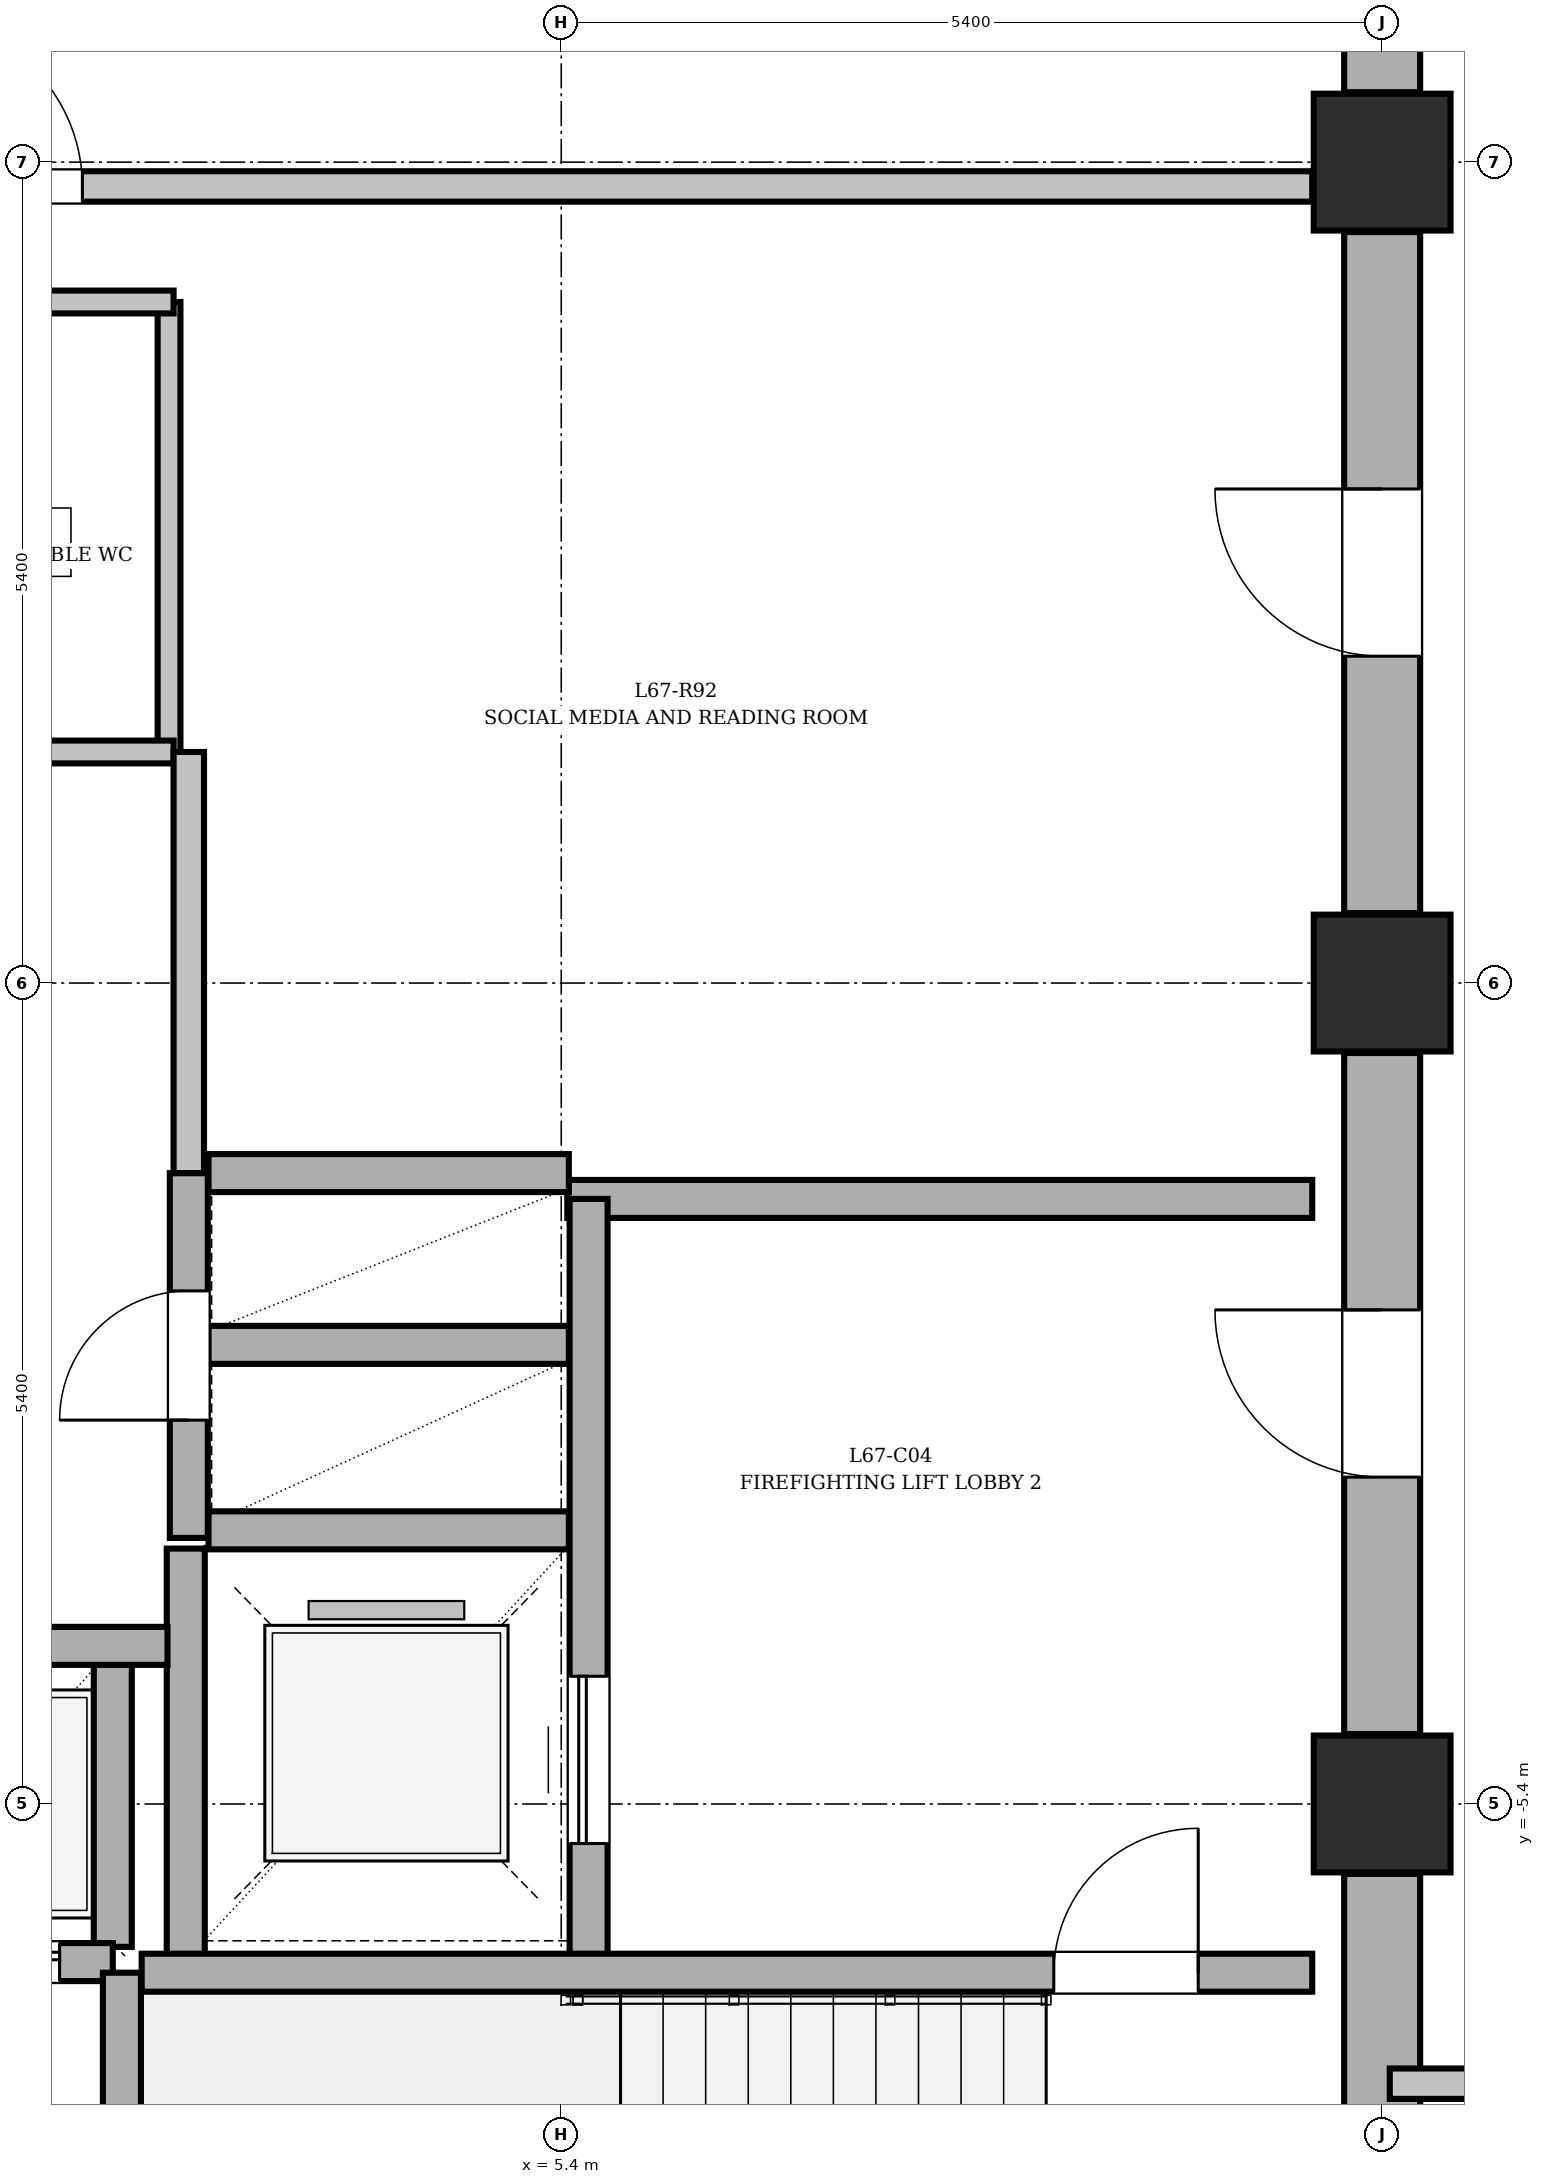
"""IFC4 building model, lengths in metres.
Left out: names, types, materials, properties, quantities, classifications, styles, units other than length and angle.
Written with IfcOpenShell. Run it as: python <this file> out.ifc"""

import sys

from ifc_helpers import new_model, si_unit, direction, frame, frame_2d, origin, origin_2d, place, context, subcontext, project, spatial, rectangle, extrude, element, fill, save


model = new_model("IFC4")
c1 = context("Model", 3, precision=1e-05, world=origin(), true_north=direction((0.0, 1.0)))
c2 = subcontext(c1, "Body", "Model", "MODEL_VIEW")
j1 = project(units=[si_unit("LENGTHUNIT", "METRE"), si_unit("PLANEANGLEUNIT", "RADIAN")], contexts=[c1])
p1 = place(None, origin())
s1 = spatial("IfcSite", under=j1, at=p1, CompositionType="ELEMENT")
p2 = place(p1, origin())
s2 = spatial("IfcBuilding", under=s1, at=p2, CompositionType="ELEMENT")
p3 = place(p2, frame((0.0, 0.0, 258.75)))
s3 = spatial("IfcBuildingStorey", under=s2, at=p3, CompositionType="ELEMENT", Elevation=258.75)
for number, where, z_axis, x_axis in (
    (1, (10.8, -5.4, 0.0), (0.0, 0.0, 1.0), (1.0, 0.0, 0.0)),
    (2, (10.8, 0.0, 0.0), (0.0, 0.0, 1.0), (1.0, 0.0, 0.0)),
    (3, (10.8, 5.4, 0.0), (0.0, 0.0, 1.0), (1.0, 0.0, 0.0)),
):
    element("IfcColumn", number, at=place(p3, frame(where, z_axis=z_axis, x_axis=x_axis)), inside=s3, PredefinedType="COLUMN", context=c2, shape_type="SweptSolid", body=[
        extrude(rectangle(XDim=0.9, YDim=0.9, at=origin_2d()), origin(), (0.0, 0.0, 1.0), 3.75),
    ])
p4 = place(p3, frame((10.8, -10.34, 0.0), z_axis=(0.0, 0.0, 1.0), x_axis=(0.0, 1.0, 0.0)))
e4 = element("IfcWall", 4, at=p4, inside=s3, PredefinedType="SHEAR", context=c2, shape_type="SweptSolid", body=[
    extrude(rectangle(XDim=4.48, YDim=0.5, at=frame_2d((2.24, 0.0))), origin(), (0.0, 0.0, 1.0), 3.75),
])
p5 = place(p3, frame((10.8, -4.94, 0.0), z_axis=(0.0, 0.0, 1.0), x_axis=(0.0, 1.0, 0.0)))
e5 = element("IfcWall", 5, at=p5, inside=s3, PredefinedType="SHEAR", context=c2, shape_type="SweptSolid", body=[
    extrude(rectangle(XDim=4.48, YDim=0.5, at=frame_2d((2.24, 0.0))), origin(), (0.0, 0.0, 1.0), 3.75),
])
p6 = place(p5, frame((1.69, 0.0, 0.0)))
e6 = element("IfcOpeningElement", 6, at=p6, cuts=e5, PredefinedType="OPENING", context=c2, shape_type="SweptSolid", body=[
    extrude(rectangle(XDim=1.1, YDim=2.1, at=frame_2d((0.55, 1.05))), frame((0.0, 0.26, 0.0), z_axis=(0.0, -1.0, 0.0), x_axis=(1.0, 0.0, 0.0)), (0.0, 0.0, 1.0), 0.52),
])
p7 = place(p3, frame((10.8, 0.46, 0.0), z_axis=(0.0, 0.0, 1.0), x_axis=(0.0, 1.0, 0.0)))
e7 = element("IfcWall", 7, at=p7, inside=s3, PredefinedType="SHEAR", context=c2, shape_type="SweptSolid", body=[
    extrude(rectangle(XDim=4.48, YDim=0.5, at=frame_2d((2.24, 0.0))), origin(), (0.0, 0.0, 1.0), 3.75),
])
p8 = place(p7, frame((1.69, 0.0, 0.0)))
e8 = element("IfcOpeningElement", 8, at=p8, cuts=e7, PredefinedType="OPENING", context=c2, shape_type="SweptSolid", body=[
    extrude(rectangle(XDim=1.1, YDim=2.1, at=frame_2d((0.55, 1.05))), frame((0.0, 0.26, 0.0), z_axis=(0.0, -1.0, 0.0), x_axis=(1.0, 0.0, 0.0)), (0.0, 0.0, 1.0), 0.52),
])
p9 = place(p3, frame((10.8, 5.86, 0.0), z_axis=(0.0, 0.0, 1.0), x_axis=(0.0, 1.0, 0.0)))
e9 = element("IfcWall", 9, at=p9, inside=s3, PredefinedType="SHEAR", context=c2, shape_type="SweptSolid", body=[
    extrude(rectangle(XDim=4.48, YDim=0.5, at=frame_2d((2.24, 0.0))), origin(), (0.0, 0.0, 1.0), 3.75),
])
p10 = place(p3, frame((2.93, -6.51, 0.0), z_axis=(0.0, 0.0, 1.0), x_axis=(0.0, 1.0, 0.0)))
e10 = element("IfcWall", 10, at=p10, inside=s3, PredefinedType="SHEAR", context=c2, shape_type="SweptSolid", body=[
    extrude(rectangle(XDim=2.79, YDim=0.25, at=frame_2d((1.395, 0.0))), origin(), (0.0, 0.0, 1.0), 3.75),
])
p11 = place(p3, frame((5.44, -1.42, 0.0), z_axis=(0.0, 0.0, 1.0), x_axis=(1.0, 0.0, 0.0)))
e11 = element("IfcWall", 11, at=p11, inside=s3, PredefinedType="SHEAR", context=c2, shape_type="SweptSolid", body=[
    extrude(rectangle(XDim=4.9, YDim=0.25, at=frame_2d((2.45, 0.0))), origin(), (0.0, 0.0, 1.0), 3.75),
])
p12 = place(p3, frame((3.08, -3.6, 0.0), z_axis=(0.0, 0.0, 1.0), x_axis=(1.0, 0.0, 0.0)))
e12 = element("IfcWall", 12, at=p12, inside=s3, PredefinedType="SHEAR", context=c2, shape_type="SweptSolid", body=[
    extrude(rectangle(XDim=2.37, YDim=0.25, at=frame_2d((1.185, 0.0))), origin(), (0.0, 0.0, 1.0), 3.75),
])
p13 = place(p3, frame((5.58, -6.51, 0.0), z_axis=(0.0, 0.0, 1.0), x_axis=(0.0, 1.0, 0.0)))
e13 = element("IfcWall", 13, at=p13, inside=s3, PredefinedType="SHEAR", context=c2, shape_type="SweptSolid", body=[
    extrude(rectangle(XDim=5.09, YDim=0.25, at=frame_2d((2.545, 0.0))), origin(), (0.0, 0.0, 1.0), 3.75),
])
p14 = place(p13, frame((0.85, 0.0, 0.0)))
e14 = element("IfcOpeningElement", 14, at=p14, cuts=e13, PredefinedType="OPENING", context=c2, shape_type="SweptSolid", body=[
    extrude(rectangle(XDim=1.1, YDim=2.1, at=frame_2d((0.55, 1.05))), frame((0.0, 0.135, 0.0), z_axis=(0.0, -1.0, 0.0), x_axis=(1.0, 0.0, 0.0)), (0.0, 0.0, 1.0), 0.27),
])
p15 = place(p3, frame((2.45, -6.34, 0.0), z_axis=(0.0, 0.0, 1.0), x_axis=(0.0, 1.0, 0.0)))
e15 = element("IfcWall", 15, at=p15, inside=s3, PredefinedType="SHEAR", context=c2, shape_type="SweptSolid", body=[
    extrude(rectangle(XDim=1.88, YDim=0.25, at=frame_2d((0.94, 0.0))), origin(), (0.0, 0.0, 1.0), 3.75),
])
p16 = place(p3, frame((-1.22, -6.44, 0.0), z_axis=(0.0, 0.0, 1.0), x_axis=(1.0, 0.0, 0.0)))
e16 = element("IfcWall", 16, at=p16, inside=s3, PredefinedType="SHEAR", context=c2, shape_type="SweptSolid", body=[
    extrude(rectangle(XDim=3.67, YDim=0.25, at=frame_2d((1.835, 0.0))), origin(), (0.0, 0.0, 1.0), 3.75),
])
p17 = place(p16, frame((0.35, 0.0, 0.0)))
e17 = element("IfcOpeningElement", 17, at=p17, cuts=e16, PredefinedType="OPENING", context=c2, shape_type="SweptSolid", body=[
    extrude(rectangle(XDim=1.1, YDim=2.1, at=frame_2d((0.55, 1.05))), frame((0.0, 0.135, 0.0), z_axis=(0.0, -1.0, 0.0), x_axis=(1.0, 0.0, 0.0)), (0.0, 0.0, 1.0), 0.27),
])
p18 = place(p16, frame((2.22, 0.0, 0.0)))
e18 = element("IfcOpeningElement", 18, at=p18, cuts=e16, PredefinedType="OPENING", context=c2, shape_type="SweptSolid", body=[
    extrude(rectangle(XDim=1.1, YDim=2.1, at=frame_2d((0.55, 1.05))), frame((0.0, 0.135, 0.0), z_axis=(0.0, -1.0, 0.0), x_axis=(1.0, 0.0, 0.0)), (0.0, 0.0, 1.0), 0.27),
])
p19 = place(p3, frame((-1.22, -4.36, 0.0), z_axis=(0.0, 0.0, 1.0), x_axis=(1.0, 0.0, 0.0)))
e19 = element("IfcWall", 19, at=p19, inside=s3, PredefinedType="SHEAR", context=c2, shape_type="SweptSolid", body=[
    extrude(rectangle(XDim=4.03, YDim=0.25, at=frame_2d((2.015, 0.0))), origin(), (0.0, 0.0, 1.0), 3.75),
])
for number, where, z_axis, x_axis in (
    (20, (3.08, -2.38, 0.0), (0.0, 0.0, 1.0), (1.0, 0.0, 0.0)),
    (21, (3.08, -1.25, 0.0), (0.0, 0.0, 1.0), (1.0, 0.0, 0.0)),
):
    element("IfcWall", number, at=place(p3, frame(where, z_axis=z_axis, x_axis=x_axis)), inside=s3, PredefinedType="SHEAR", context=c2, shape_type="SweptSolid", body=[
        extrude(rectangle(XDim=2.37, YDim=0.25, at=frame_2d((1.185, 0.0))), origin(), (0.0, 0.0, 1.0), 3.75),
    ])
p20 = place(p3, frame((2.95, -3.65, 0.0), z_axis=(0.0, 0.0, 1.0), x_axis=(0.0, 1.0, 0.0)))
e22 = element("IfcWall", 22, at=p20, inside=s3, PredefinedType="SHEAR", context=c2, shape_type="SweptSolid", body=[
    extrude(rectangle(XDim=2.4, YDim=0.25, at=frame_2d((1.2, 0.0))), origin(), (0.0, 0.0, 1.0), 3.75),
])
p21 = place(p20, frame((0.775, 0.0, 0.0)))
e23 = element("IfcOpeningElement", 23, at=p21, cuts=e22, PredefinedType="OPENING", context=c2, shape_type="SweptSolid", body=[
    extrude(rectangle(XDim=0.85, YDim=2.1, at=frame_2d((0.425, 1.05))), frame((0.0, 0.135, 0.0), z_axis=(0.0, -1.0, 0.0), x_axis=(1.0, 0.0, 0.0)), (0.0, 0.0, 1.0), 0.27),
])
p22 = place(p3, frame((2.64, -6.51, 0.0), z_axis=(0.0, 0.0, 1.0), x_axis=(1.0, 0.0, 0.0)))
e24 = element("IfcWall", 24, at=p22, inside=s3, PredefinedType="SHEAR", context=c2, shape_type="SweptSolid", body=[
    extrude(rectangle(XDim=7.7, YDim=0.25, at=frame_2d((3.85, 0.0))), origin(), (0.0, 0.0, 1.0), 3.75),
])
p23 = place(p22, frame((6.0, 0.0, 0.0)))
e25 = element("IfcOpeningElement", 25, at=p23, cuts=e24, PredefinedType="OPENING", context=c2, shape_type="SweptSolid", body=[
    extrude(rectangle(XDim=0.95, YDim=2.1, at=frame_2d((0.475, 1.05))), frame((0.0, 0.135, 0.0), z_axis=(0.0, -1.0, 0.0), x_axis=(1.0, 0.0, 0.0)), (0.0, 0.0, 1.0), 0.27),
])
p24 = place(p3, frame((2.51, -10.55, 0.0), z_axis=(0.0, 0.0, 1.0), x_axis=(0.0, 1.0, 0.0)))
e26 = element("IfcWall", 26, at=p24, inside=s3, PredefinedType="SHEAR", context=c2, shape_type="SweptSolid", body=[
    extrude(rectangle(XDim=4.04, YDim=0.25, at=frame_2d((2.02, 0.0))), origin(), (0.0, 0.0, 1.0), 3.75),
])
p25 = place(p3, frame((2.82, 1.52, 0.0), z_axis=(0.0, 0.0, 1.0), x_axis=(0.0, 1.0, 0.0)))
e27 = element("IfcWall", 27, at=p25, inside=s3, PredefinedType="PARTITIONING", context=c2, shape_type="SweptSolid", body=[
    extrude(rectangle(XDim=2.96, YDim=0.15, at=frame_2d((1.48, 0.0))), origin(), (0.0, 0.0, 1.0), 3.57),
])
for number, where, z_axis, x_axis in (
    (28, (0.18, 4.48, 0.0), (0.0, 0.0, 1.0), (1.0, 0.0, 0.0)),
    (29, (0.18, 1.52, 0.0), (0.0, 0.0, 1.0), (1.0, 0.0, 0.0)),
):
    element("IfcWall", number, at=place(p3, frame(where, z_axis=z_axis, x_axis=x_axis)), inside=s3, PredefinedType="PARTITIONING", context=c2, shape_type="SweptSolid", body=[
        extrude(rectangle(XDim=2.67, YDim=0.15, at=frame_2d((1.335, 0.0))), origin(), (0.0, 0.0, 1.0), 3.57),
    ])
p26 = place(p3, frame((0.35, 5.24, 0.0), z_axis=(0.0, 0.0, 1.0), x_axis=(1.0, 0.0, 0.0)))
e30 = element("IfcWall", 30, at=p26, inside=s3, PredefinedType="PARTITIONING", context=c2, shape_type="SweptSolid", body=[
    extrude(rectangle(XDim=9.99, YDim=0.2, at=frame_2d((4.995, 0.0))), origin(), (0.0, 0.0, 1.0), 3.57),
])
p27 = place(p26, frame((0.8, 0.0, 0.0)))
e31 = element("IfcOpeningElement", 31, at=p27, cuts=e30, PredefinedType="OPENING", context=c2, shape_type="SweptSolid", body=[
    extrude(rectangle(XDim=1.1, YDim=2.1, at=frame_2d((0.55, 1.05))), frame((0.0, 0.11, 0.0), z_axis=(0.0, -1.0, 0.0), x_axis=(1.0, 0.0, 0.0)), (0.0, 0.0, 1.0), 0.22),
])
p28 = place(p3, frame((10.85, -7.24, 0.0), z_axis=(0.0, 0.0, 1.0), x_axis=(1.0, 0.0, 0.0)))
e32 = element("IfcWall", 32, at=p28, inside=s3, PredefinedType="PARTITIONING", context=c2, shape_type="SweptSolid", body=[
    extrude(rectangle(XDim=2.31, YDim=0.2, at=frame_2d((1.155, 0.0))), origin(), (0.0, 0.0, 1.0), 3.57),
])
p29 = place(p3, frame((2.95, -1.25, 0.0), z_axis=(0.0, 0.0, 1.0), x_axis=(0.0, 1.0, 0.0)))
e33 = element("IfcWall", 33, at=p29, inside=s3, PredefinedType="PARTITIONING", context=c2, shape_type="SweptSolid", body=[
    extrude(rectangle(XDim=2.77, YDim=0.2, at=frame_2d((1.385, 0.0))), origin(), (0.0, 0.0, 1.0), 3.57),
])
p30 = place(p23, origin())
e34 = element("IfcDoor", 34, at=p30, inside=s3, OperationType="SINGLE_SWING_RIGHT", PredefinedType="DOOR", context=c2, shape_type="SweptSolid", body=[
    extrude(rectangle(XDim=0.95, YDim=2.1, at=frame_2d((0.475, 1.05))), frame((0.0, 0.025, 0.0), z_axis=(0.0, -1.0, 0.0), x_axis=(1.0, 0.0, 0.0)), (0.0, 0.0, 1.0), 0.05),
])
fill(e25, e34)
p31 = place(p21, origin())
e35 = element("IfcDoor", 35, at=p31, inside=s3, OperationType="SINGLE_SWING_LEFT", PredefinedType="DOOR", context=c2, shape_type="SweptSolid", body=[
    extrude(rectangle(XDim=0.85, YDim=2.1, at=frame_2d((0.425, 1.05))), frame((0.0, 0.025, 0.0), z_axis=(0.0, -1.0, 0.0), x_axis=(1.0, 0.0, 0.0)), (0.0, 0.0, 1.0), 0.05),
])
fill(e23, e35)
p32 = place(p6, origin())
e36 = element("IfcDoor", 36, at=p32, inside=s3, OperationType="SINGLE_SWING_RIGHT", PredefinedType="DOOR", context=c2, shape_type="SweptSolid", body=[
    extrude(rectangle(XDim=1.1, YDim=2.1, at=frame_2d((0.55, 1.05))), frame((0.0, 0.025, 0.0), z_axis=(0.0, -1.0, 0.0), x_axis=(1.0, 0.0, 0.0)), (0.0, 0.0, 1.0), 0.05),
])
fill(e6, e36)
p33 = place(p14, origin())
e37 = element("IfcDoor", 37, at=p33, inside=s3, OperationType="SLIDING_TO_RIGHT", PredefinedType="DOOR", context=c2, shape_type="SweptSolid", body=[
    extrude(rectangle(XDim=1.1, YDim=2.1, at=frame_2d((0.55, 1.05))), frame((0.0, 0.025, 0.0), z_axis=(0.0, -1.0, 0.0), x_axis=(1.0, 0.0, 0.0)), (0.0, 0.0, 1.0), 0.05),
])
fill(e14, e37)
p34 = place(p27, origin())
e38 = element("IfcDoor", 38, at=p34, inside=s3, OperationType="SINGLE_SWING_LEFT", PredefinedType="DOOR", context=c2, shape_type="SweptSolid", body=[
    extrude(rectangle(XDim=1.1, YDim=2.1, at=frame_2d((0.55, 1.05))), frame((0.0, 0.025, 0.0), z_axis=(0.0, -1.0, 0.0), x_axis=(1.0, 0.0, 0.0)), (0.0, 0.0, 1.0), 0.05),
])
fill(e31, e38)
p35 = place(p8, origin())
e39 = element("IfcDoor", 39, at=p35, inside=s3, OperationType="SINGLE_SWING_RIGHT", PredefinedType="DOOR", context=c2, shape_type="SweptSolid", body=[
    extrude(rectangle(XDim=1.1, YDim=2.1, at=frame_2d((0.55, 1.05))), frame((0.0, 0.025, 0.0), z_axis=(0.0, -1.0, 0.0), x_axis=(1.0, 0.0, 0.0)), (0.0, 0.0, 1.0), 0.05),
])
fill(e8, e39)
p36 = place(p18, origin())
e40 = element("IfcDoor", 40, at=p36, inside=s3, OperationType="SLIDING_TO_LEFT", PredefinedType="DOOR", context=c2, shape_type="SweptSolid", body=[
    extrude(rectangle(XDim=1.1, YDim=2.1, at=frame_2d((0.55, 1.05))), frame((0.0, 0.025, 0.0), z_axis=(0.0, -1.0, 0.0), x_axis=(1.0, 0.0, 0.0)), (0.0, 0.0, 1.0), 0.05),
])
fill(e18, e40)
save(model, sys.argv[1])
